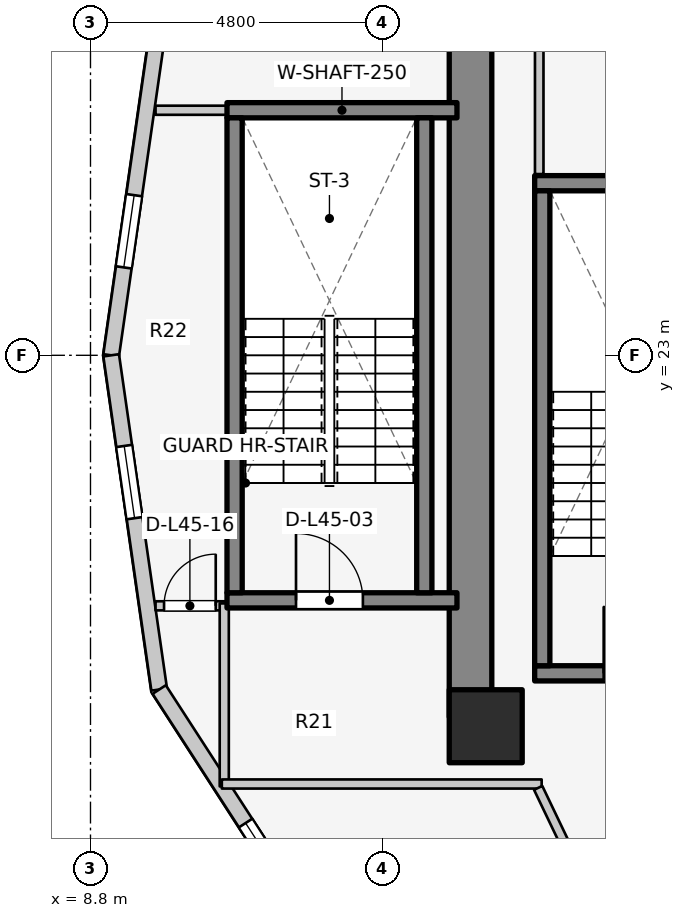
"""IFC4 building model, lengths in metres.
Left out: names, types, materials, properties, quantities, classifications, styles, units other than length and angle.
Written with IfcOpenShell. Run it as: python <this file> out.ifc"""

import sys

from ifc_helpers import new_model, si_unit, direction, frame, frame_2d, origin, origin_2d, place, context, subcontext, project, spatial, rectangle, extrude, element, fill, save


model = new_model("IFC4")
c1 = context("Model", 3, precision=1e-05, world=origin(), true_north=direction((0.0, 1.0)))
c2 = subcontext(c1, "Body", "Model", "MODEL_VIEW")
j1 = project(units=[si_unit("LENGTHUNIT", "METRE"), si_unit("PLANEANGLEUNIT", "RADIAN")], contexts=[c1])
p1 = place(None, origin())
s1 = spatial("IfcSite", under=j1, at=p1, CompositionType="ELEMENT")
p2 = place(p1, origin())
s2 = spatial("IfcBuilding", under=s1, at=p2, CompositionType="ELEMENT")
p3 = place(p2, frame((0.0, 0.0, 149.8)))
s3 = spatial("IfcBuildingStorey", under=s2, at=p3, CompositionType="ELEMENT", Elevation=149.8)
p4 = place(p3, frame((15.05, 17.05, 0.0), z_axis=(0.0, 0.0, 1.0), x_axis=(0.0, 1.0, 0.0)))
e1 = element("IfcWall", 1, at=p4, inside=s3, PredefinedType="SHEAR", context=c2, shape_type="SweptSolid", body=[
    extrude(rectangle(XDim=12.8, YDim=0.7, at=frame_2d((6.4, 0.0))), origin(), (0.0, 0.0, 1.0), 3.1),
])
p5 = place(p3, frame((16.105, 17.77, 0.0), z_axis=(0.0, 0.0, 1.0), x_axis=(1.0, 0.0, 0.0)))
e2 = element("IfcWall", 2, at=p5, inside=s3, PredefinedType="SOLIDWALL", context=c2, shape_type="SweptSolid", body=[
    extrude(rectangle(XDim=3.37, YDim=0.25, at=frame_2d((1.685, 0.0))), origin(), (0.0, 0.0, 1.0), 3.1),
])
p6 = place(p5, frame((1.135, 0.0, 0.0)))
e3 = element("IfcOpeningElement", 3, at=p6, cuts=e2, PredefinedType="OPENING", context=c2, shape_type="SweptSolid", body=[
    extrude(rectangle(XDim=1.1, YDim=2.1, at=frame_2d((0.55, 1.05))), frame((0.0, 0.135, 0.0), z_axis=(0.0, -1.0, 0.0), x_axis=(1.0, 0.0, 0.0)), (0.0, 0.0, 1.0), 0.27),
])
p7 = place(p3, frame((16.105, 25.83, 0.0), z_axis=(0.0, 0.0, 1.0), x_axis=(1.0, 0.0, 0.0)))
e4 = element("IfcWall", 4, at=p7, inside=s3, PredefinedType="SOLIDWALL", context=c2, shape_type="SweptSolid", body=[
    extrude(rectangle(XDim=3.37, YDim=0.25, at=frame_2d((1.685, 0.0))), origin(), (0.0, 0.0, 1.0), 3.1),
])
p8 = place(p3, frame((16.23, 17.895, 0.0), z_axis=(0.0, 0.0, 1.0), x_axis=(0.0, 1.0, 0.0)))
e5 = element("IfcWall", 5, at=p8, inside=s3, PredefinedType="SOLIDWALL", context=c2, shape_type="SweptSolid", body=[
    extrude(rectangle(XDim=7.81, YDim=0.25, at=frame_2d((3.905, 0.0))), origin(), (0.0, 0.0, 1.0), 3.1),
])
p9 = place(p3, frame((11.045, 18.97, 0.0), z_axis=(0.0, 0.0, 1.0), x_axis=(1.0, 0.0, 0.0)))
e6 = element("IfcWall", 6, at=p9, inside=s3, PredefinedType="SOLIDWALL", context=c2, shape_type="SweptSolid", body=[
    extrude(rectangle(XDim=3.782, YDim=0.25, at=frame_2d((1.891, 0.0))), origin(), (0.0, 0.0, 1.0), 3.1),
])
p10 = place(p9, frame((1.135, 0.0, 0.0)))
e7 = element("IfcOpeningElement", 7, at=p10, cuts=e6, PredefinedType="OPENING", context=c2, shape_type="SweptSolid", body=[
    extrude(rectangle(XDim=1.1, YDim=2.1, at=frame_2d((0.55, 1.05))), frame((0.0, 0.135, 0.0), z_axis=(0.0, -1.0, 0.0), x_axis=(1.0, 0.0, 0.0)), (0.0, 0.0, 1.0), 0.27),
])
p11 = place(p3, frame((11.045, 27.03, 0.0), z_axis=(0.0, 0.0, 1.0), x_axis=(1.0, 0.0, 0.0)))
e8 = element("IfcWall", 8, at=p11, inside=s3, PredefinedType="SOLIDWALL", context=c2, shape_type="SweptSolid", body=[
    extrude(rectangle(XDim=3.782, YDim=0.25, at=frame_2d((1.891, 0.0))), origin(), (0.0, 0.0, 1.0), 3.1),
])
for number, where, z_axis, x_axis in (
    (9, (11.17, 19.095, 0.0), (0.0, 0.0, 1.0), (0.0, 1.0, 0.0)),
    (10, (14.29, 19.095, 0.0), (0.0, 0.0, 1.0), (0.0, 1.0, 0.0)),
):
    element("IfcWall", number, at=place(p3, frame(where, z_axis=z_axis, x_axis=x_axis)), inside=s3, PredefinedType="SOLIDWALL", context=c2, shape_type="SweptSolid", body=[
        extrude(rectangle(XDim=7.81, YDim=0.25, at=frame_2d((3.905, 0.0))), origin(), (0.0, 0.0, 1.0), 3.1),
    ])
p12 = place(p3, frame((15.3, 16.9, 0.0), z_axis=(0.0, 0.0, 1.0), x_axis=(1.0, 0.0, 0.0)))
e11 = element("IfcColumn", 11, at=p12, inside=s3, PredefinedType="COLUMN", context=c2, shape_type="SweptSolid", body=[
    extrude(rectangle(XDim=1.2, YDim=1.2, at=origin_2d()), origin(), (0.0, 0.0, 1.0), 3.1),
])
p13 = place(p3, frame((9.93, 28.497, 0.0), z_axis=(0.0, 0.0, 1.0), x_axis=(-0.142227632286, -0.989833976288, 0.0)))
e12 = element("IfcWall", 12, at=p13, inside=s3, PredefinedType="STANDARD", context=c2, shape_type="SweptSolid", body=[
    extrude(rectangle(XDim=5.553, YDim=0.26, at=frame_2d((2.776, 0.0))), origin(), (0.0, 0.0, 1.0), 2.57),
])
p14 = place(p13, frame((2.892, 0.0, 0.75)))
e13 = element("IfcOpeningElement", 13, at=p14, cuts=e12, PredefinedType="OPENING", context=c2, shape_type="SweptSolid", body=[
    extrude(rectangle(XDim=1.2, YDim=1.5, at=frame_2d((0.6, 0.75))), frame((0.0, 0.14, 0.0), z_axis=(0.0, -1.0, 0.0), x_axis=(1.0, 0.0, 0.0)), (0.0, 0.0, 1.0), 0.28),
])
p15 = place(p3, frame((9.14, 23.0, 0.0), z_axis=(0.0, 0.0, 1.0), x_axis=(0.142227632286, -0.989833976288, 0.0)))
e14 = element("IfcWall", 14, at=p15, inside=s3, PredefinedType="STANDARD", context=c2, shape_type="SweptSolid", body=[
    extrude(rectangle(XDim=5.553, YDim=0.26, at=frame_2d((2.776, 0.0))), origin(), (0.0, 0.0, 1.0), 2.57),
])
p16 = place(p15, frame((1.506, 0.0, 0.75)))
e15 = element("IfcOpeningElement", 15, at=p16, cuts=e14, PredefinedType="OPENING", context=c2, shape_type="SweptSolid", body=[
    extrude(rectangle(XDim=1.2, YDim=1.5, at=frame_2d((0.6, 0.75))), frame((0.0, 0.14, 0.0), z_axis=(0.0, -1.0, 0.0), x_axis=(1.0, 0.0, 0.0)), (0.0, 0.0, 1.0), 0.28),
])
p17 = place(p3, frame((9.93, 17.503, 0.0), z_axis=(0.0, 0.0, 1.0), x_axis=(0.543358984534, -0.839500454989, 0.0)))
e16 = element("IfcWall", 16, at=p17, inside=s3, PredefinedType="STANDARD", context=c2, shape_type="SweptSolid", body=[
    extrude(rectangle(XDim=4.511, YDim=0.26, at=frame_2d((2.256, 0.0))), origin(), (0.0, 0.0, 1.0), 1.22),
])
p18 = place(p17, frame((2.615, 0.0, 0.15)))
e17 = element("IfcOpeningElement", 17, at=p18, cuts=e16, PredefinedType="OPENING", context=c2, shape_type="SweptSolid", body=[
    extrude(rectangle(XDim=1.2, YDim=0.9, at=frame_2d((0.6, 0.45))), frame((0.0, 0.14, 0.0), z_axis=(0.0, -1.0, 0.0), x_axis=(1.0, 0.0, 0.0)), (0.0, 0.0, 1.0), 0.28),
])
p19 = place(p3, frame((16.18, 25.98, 0.0), z_axis=(0.0, 0.0, 1.0), x_axis=(0.0, 1.0, 0.0)))
e18 = element("IfcWall", 18, at=p19, inside=s3, PredefinedType="PLUMBINGWALL", context=c2, shape_type="SweptSolid", body=[
    extrude(rectangle(XDim=3.88, YDim=0.14, at=frame_2d((1.94, 0.0))), origin(), (0.0, 0.0, 1.0), 2.575),
])
p20 = place(p3, frame((9.87, 27.03, 0.0), z_axis=(0.0, 0.0, 1.0), x_axis=(1.0, 0.0, 0.0)))
e19 = element("IfcWall", 19, at=p20, inside=s3, PredefinedType="PARTITIONING", context=c2, shape_type="SweptSolid", body=[
    extrude(rectangle(XDim=1.17, YDim=0.15, at=frame_2d((0.585, 0.0))), origin(), (0.0, 0.0, 1.0), 2.575),
])
p21 = place(p3, frame((9.87, 18.88, 0.0), z_axis=(0.0, 0.0, 1.0), x_axis=(1.0, 0.0, 0.0)))
e20 = element("IfcWall", 20, at=p21, inside=s3, PredefinedType="PARTITIONING", context=c2, shape_type="SweptSolid", body=[
    extrude(rectangle(XDim=1.17, YDim=0.15, at=frame_2d((0.585, 0.0))), origin(), (0.0, 0.0, 1.0), 2.575),
])
p22 = place(p21, frame((0.14, 0.0, 0.0)))
e21 = element("IfcOpeningElement", 21, at=p22, cuts=e20, PredefinedType="OPENING", context=c2, shape_type="SweptSolid", body=[
    extrude(rectangle(XDim=0.85, YDim=2.05, at=frame_2d((0.425, 1.025))), frame((0.0, 0.085, 0.0), z_axis=(0.0, -1.0, 0.0), x_axis=(1.0, 0.0, 0.0)), (0.0, 0.0, 1.0), 0.17),
])
p23 = place(p3, frame((11.0, 15.91, 0.0), z_axis=(0.0, 0.0, 1.0), x_axis=(0.0, 1.0, 0.0)))
e22 = element("IfcWall", 22, at=p23, inside=s3, PredefinedType="PARTITIONING", context=c2, shape_type="SweptSolid", body=[
    extrude(rectangle(XDim=3.01, YDim=0.15, at=frame_2d((1.505, 0.0))), origin(), (0.0, 0.0, 1.0), 2.575),
])
p24 = place(p3, frame((10.96, 15.95, 0.0), z_axis=(0.0, 0.0, 1.0), x_axis=(1.0, 0.0, 0.0)))
e23 = element("IfcWall", 23, at=p24, inside=s3, PredefinedType="PARTITIONING", context=c2, shape_type="SweptSolid", body=[
    extrude(rectangle(XDim=5.26, YDim=0.15, at=frame_2d((2.63, 0.0))), origin(), (0.0, 0.0, 1.0), 1.22),
])
p25 = place(p3, frame((17.222, 13.675, 0.0), z_axis=(0.0, 0.0, 1.0), x_axis=(-0.431973389813, 0.901886351207, 0.0)))
e24 = element("IfcWall", 24, at=p25, inside=s3, PredefinedType="PARTITIONING", context=c2, shape_type="SweptSolid", body=[
    extrude(rectangle(XDim=2.452, YDim=0.15, at=frame_2d((1.226, 0.0))), origin(), (0.0, 0.0, 1.0), 2.575),
])
p26 = place(p14, origin())
e25 = element("IfcWindow", 25, at=p26, inside=s3, PartitioningType="SINGLE_PANEL", PredefinedType="WINDOW", context=c2, shape_type="SweptSolid", body=[
    extrude(rectangle(XDim=1.2, YDim=1.5, at=frame_2d((0.6, 0.75))), frame((0.0, 0.03, 0.0), z_axis=(0.0, -1.0, 0.0), x_axis=(1.0, 0.0, 0.0)), (0.0, 0.0, 1.0), 0.06),
])
fill(e13, e25)
p27 = place(p16, origin())
e26 = element("IfcWindow", 26, at=p27, inside=s3, PartitioningType="SINGLE_PANEL", PredefinedType="WINDOW", context=c2, shape_type="SweptSolid", body=[
    extrude(rectangle(XDim=1.2, YDim=1.5, at=frame_2d((0.6, 0.75))), frame((0.0, 0.03, 0.0), z_axis=(0.0, -1.0, 0.0), x_axis=(1.0, 0.0, 0.0)), (0.0, 0.0, 1.0), 0.06),
])
fill(e15, e26)
p28 = place(p18, origin())
e27 = element("IfcWindow", 27, at=p28, inside=s3, PartitioningType="SINGLE_PANEL", PredefinedType="WINDOW", context=c2, shape_type="SweptSolid", body=[
    extrude(rectangle(XDim=1.2, YDim=0.9, at=frame_2d((0.6, 0.45))), frame((0.0, 0.03, 0.0), z_axis=(0.0, -1.0, 0.0), x_axis=(1.0, 0.0, 0.0)), (0.0, 0.0, 1.0), 0.06),
])
fill(e17, e27)
p29 = place(p6, origin())
e28 = element("IfcDoor", 28, at=p29, inside=s3, OperationType="SINGLE_SWING_LEFT", PredefinedType="DOOR", context=c2, shape_type="SweptSolid", body=[
    extrude(rectangle(XDim=1.1, YDim=2.1, at=frame_2d((0.55, 1.05))), frame((0.0, 0.025, 0.0), z_axis=(0.0, -1.0, 0.0), x_axis=(1.0, 0.0, 0.0)), (0.0, 0.0, 1.0), 0.05),
])
fill(e3, e28)
p30 = place(p10, origin())
e29 = element("IfcDoor", 29, at=p30, inside=s3, OperationType="SINGLE_SWING_LEFT", PredefinedType="DOOR", context=c2, shape_type="SweptSolid", body=[
    extrude(rectangle(XDim=1.1, YDim=2.1, at=frame_2d((0.55, 1.05))), frame((0.0, 0.025, 0.0), z_axis=(0.0, -1.0, 0.0), x_axis=(1.0, 0.0, 0.0)), (0.0, 0.0, 1.0), 0.05),
])
fill(e7, e29)
p31 = place(p22, origin())
e30 = element("IfcDoor", 30, at=p31, inside=s3, OperationType="SINGLE_SWING_RIGHT", PredefinedType="DOOR", context=c2, shape_type="SweptSolid", body=[
    extrude(rectangle(XDim=0.85, YDim=2.05, at=frame_2d((0.425, 1.025))), frame((0.0, 0.025, 0.0), z_axis=(0.0, -1.0, 0.0), x_axis=(1.0, 0.0, 0.0)), (0.0, 0.0, 1.0), 0.05),
])
fill(e21, e30)
save(model, sys.argv[1])
